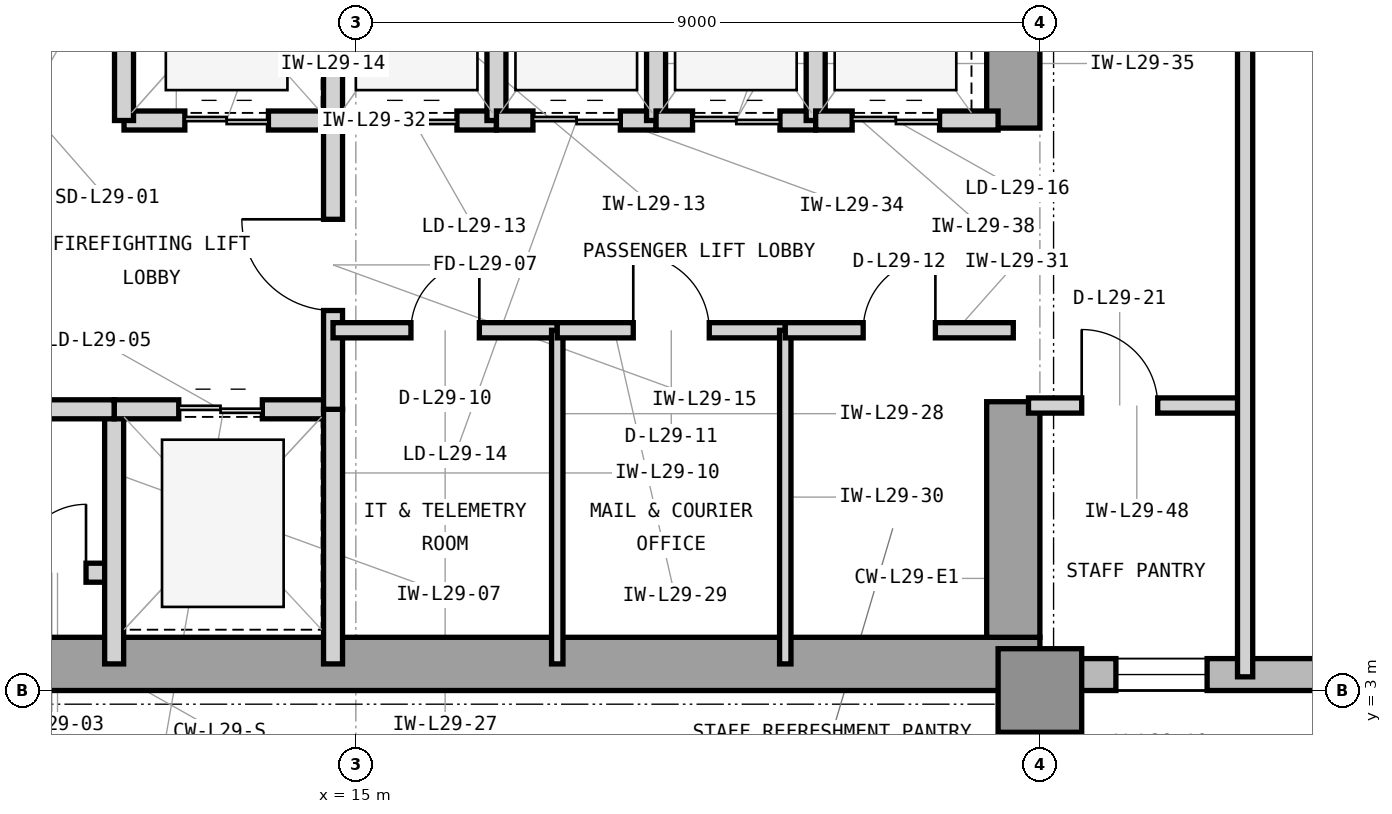
"""IFC4 building model, lengths in metres.
Left out: names, types, materials, properties, quantities, classifications, styles, units other than length and angle.
Written with IfcOpenShell. Run it as: python <this file> out.ifc"""

import sys

from ifc_helpers import new_model, si_unit, direction, frame, frame_2d, origin, origin_2d, place, context, subcontext, project, spatial, rectangle, extrude, element, fill, save


model = new_model("IFC4")
c1 = context("Model", 3, precision=1e-05, world=origin(), true_north=direction((0.0, 1.0)))
c2 = subcontext(c1, "Body", "Model", "MODEL_VIEW")
j1 = project(units=[si_unit("LENGTHUNIT", "METRE"), si_unit("PLANEANGLEUNIT", "RADIAN")], contexts=[c1])
p1 = place(None, origin())
s1 = spatial("IfcSite", under=j1, at=p1, CompositionType="ELEMENT")
p2 = place(p1, origin())
s2 = spatial("IfcBuilding", under=s1, at=p2, CompositionType="ELEMENT")
p3 = place(p2, frame((0.0, 0.0, 124.5)))
s3 = spatial("IfcBuildingStorey", under=s2, at=p3, CompositionType="ELEMENT", Elevation=124.5)
p4 = place(p3, frame((7.475, 3.35, 0.0), z_axis=(0.0, 0.0, 1.0), x_axis=(1.0, 0.0, 0.0)))
e1 = element("IfcWall", 1, at=p4, inside=s3, PredefinedType="SHEAR", context=c2, shape_type="SweptSolid", body=[
    extrude(rectangle(XDim=16.525, YDim=0.7, at=frame_2d((8.262, 0.0))), origin(), (0.0, 0.0, 1.0), 3.9),
])
p5 = place(p3, frame((23.65, 3.7, 0.0), z_axis=(0.0, 0.0, 1.0), x_axis=(0.0, 1.0, 0.0)))
e2 = element("IfcWall", 2, at=p5, inside=s3, PredefinedType="SHEAR", context=c2, shape_type="SweptSolid", body=[
    extrude(rectangle(XDim=3.1, YDim=0.7, at=frame_2d((1.55, 0.0))), origin(), (0.0, 0.0, 1.0), 3.9),
])
p6 = place(p3, frame((23.65, 10.4, 0.0), z_axis=(0.0, 0.0, 1.0), x_axis=(0.0, 1.0, 0.0)))
e3 = element("IfcWall", 3, at=p6, inside=s3, PredefinedType="SHEAR", context=c2, shape_type="SweptSolid", body=[
    extrude(rectangle(XDim=3.2, YDim=0.7, at=frame_2d((1.6, 0.0))), origin(), (0.0, 0.0, 1.0), 3.9),
])
p7 = place(p3, frame((24.0, 3.0, 0.0), z_axis=(0.0, 0.0, 1.0), x_axis=(1.0, 0.0, 0.0)))
e4 = element("IfcColumn", 4, at=p7, inside=s3, PredefinedType="COLUMN", context=c2, shape_type="SweptSolid", body=[
    extrude(rectangle(XDim=1.1, YDim=1.1, at=origin_2d()), origin(), (0.0, 0.0, 1.0), 3.9),
])
p8 = place(p3, frame((23.9, 3.21, 0.0), z_axis=(0.0, 0.0, 1.0), x_axis=(1.0, 0.0, 0.0)))
e5 = element("IfcWall", 5, at=p8, inside=s3, PredefinedType="STANDARD", context=c2, shape_type="SweptSolid", body=[
    extrude(rectangle(XDim=18.1, YDim=0.42, at=frame_2d((9.05, 0.0))), origin(), (0.0, 0.0, 1.0), 3.7),
])
p9 = place(p8, frame((5.538, 0.0, 0.85)))
e6 = element("IfcOpeningElement", 6, at=p9, cuts=e5, PredefinedType="OPENING", context=c2, shape_type="SweptSolid", body=[
    extrude(rectangle(XDim=2.5, YDim=2.25, at=frame_2d((1.25, 1.125))), frame((0.0, 0.22, 0.0), z_axis=(0.0, -1.0, 0.0), x_axis=(1.0, 0.0, 0.0)), (0.0, 0.0, 1.0), 0.44),
])
p10 = place(p8, frame((14.938, 0.0, 0.85)))
e7 = element("IfcOpeningElement", 7, at=p10, cuts=e5, PredefinedType="OPENING", context=c2, shape_type="SweptSolid", body=[
    extrude(rectangle(XDim=1.8, YDim=2.25, at=frame_2d((0.9, 1.125))), frame((0.0, 0.22, 0.0), z_axis=(0.0, -1.0, 0.0), x_axis=(1.0, 0.0, 0.0)), (0.0, 0.0, 1.0), 0.44),
])
p11 = place(p8, frame((1.1, 0.0, 0.85)))
e8 = element("IfcOpeningElement", 8, at=p11, cuts=e5, PredefinedType="OPENING", context=c2, shape_type="SweptSolid", body=[
    extrude(rectangle(XDim=1.2, YDim=2.25, at=frame_2d((0.6, 1.125))), frame((0.0, 0.22, 0.0), z_axis=(0.0, -1.0, 0.0), x_axis=(1.0, 0.0, 0.0)), (0.0, 0.0, 1.0), 0.44),
])
p12 = place(p3, frame((10.33, 4.55, 0.0), z_axis=(0.0, 0.0, 1.0), x_axis=(1.0, 0.0, 0.0)))
e9 = element("IfcWall", 9, at=p12, inside=s3, PredefinedType="PARTITIONING", context=c2, shape_type="SweptSolid", body=[
    extrude(rectangle(XDim=1.49, YDim=0.25, at=frame_2d((0.745, 0.0))), origin(), (0.0, 0.0, 1.0), 3.69),
])
p13 = place(p12, frame((0.22, 0.0, 0.0)))
e10 = element("IfcOpeningElement", 10, at=p13, cuts=e9, PredefinedType="OPENING", context=c2, shape_type="SweptSolid", body=[
    extrude(rectangle(XDim=0.9, YDim=2.1, at=frame_2d((0.45, 1.05))), frame((0.0, 0.135, 0.0), z_axis=(0.0, -1.0, 0.0), x_axis=(1.0, 0.0, 0.0)), (0.0, 0.0, 1.0), 0.27),
])
p14 = place(p3, frame((11.82, 3.35, 0.0), z_axis=(0.0, 0.0, 1.0), x_axis=(0.0, 1.0, 0.0)))
e11 = element("IfcWall", 11, at=p14, inside=s3, PredefinedType="PARTITIONING", context=c2, shape_type="SweptSolid", body=[
    extrude(rectangle(XDim=3.35, YDim=0.25, at=frame_2d((1.675, 0.0))), origin(), (0.0, 0.0, 1.0), 3.69),
])
p15 = place(p3, frame((11.82, 6.7, 0.0), z_axis=(0.0, 0.0, 1.0), x_axis=(1.0, 0.0, 0.0)))
e12 = element("IfcWall", 12, at=p15, inside=s3, PredefinedType="PARTITIONING", context=c2, shape_type="SweptSolid", body=[
    extrude(rectangle(XDim=2.88, YDim=0.25, at=frame_2d((1.44, 0.0))), origin(), (0.0, 0.0, 1.0), 3.233),
])
p16 = place(p15, frame((0.85, 0.0, 0.0)))
e13 = element("IfcOpeningElement", 13, at=p16, cuts=e12, PredefinedType="OPENING", context=c2, shape_type="SweptSolid", body=[
    extrude(rectangle(XDim=1.1, YDim=2.25, at=frame_2d((0.55, 1.125))), frame((0.0, 0.135, 0.0), z_axis=(0.0, -1.0, 0.0), x_axis=(1.0, 0.0, 0.0)), (0.0, 0.0, 1.0), 0.27),
])
p17 = place(p3, frame((14.7, 3.35, 0.0), z_axis=(0.0, 0.0, 1.0), x_axis=(0.0, 1.0, 0.0)))
e14 = element("IfcWall", 14, at=p17, inside=s3, PredefinedType="PARTITIONING", context=c2, shape_type="SweptSolid", body=[
    extrude(rectangle(XDim=3.35, YDim=0.25, at=frame_2d((1.675, 0.0))), origin(), (0.0, 0.0, 1.0), 3.69),
])
p18 = place(p3, frame((11.95, 10.5, 0.0), z_axis=(0.0, 0.0, 1.0), x_axis=(1.0, 0.0, 0.0)))
e15 = element("IfcWall", 15, at=p18, inside=s3, PredefinedType="PARTITIONING", context=c2, shape_type="SweptSolid", body=[
    extrude(rectangle(XDim=2.75, YDim=0.25, at=frame_2d((1.375, 0.0))), origin(), (0.0, 0.0, 1.0), 3.233),
])
p19 = place(p18, frame((0.8, 0.0, 0.0)))
e16 = element("IfcOpeningElement", 16, at=p19, cuts=e15, PredefinedType="OPENING", context=c2, shape_type="SweptSolid", body=[
    extrude(rectangle(XDim=1.1, YDim=2.25, at=frame_2d((0.55, 1.125))), frame((0.0, 0.135, 0.0), z_axis=(0.0, -1.0, 0.0), x_axis=(1.0, 0.0, 0.0)), (0.0, 0.0, 1.0), 0.27),
])
for number, where, z_axis, x_axis in (
    (17, (11.95, 10.5, 0.0), (0.0, 0.0, 1.0), (0.0, 1.0, 0.0)),
    (18, (14.7, 10.5, 0.0), (0.0, 0.0, 1.0), (0.0, 1.0, 0.0)),
):
    element("IfcWall", number, at=place(p3, frame(where, z_axis=z_axis, x_axis=x_axis)), inside=s3, PredefinedType="PARTITIONING", context=c2, shape_type="SweptSolid", body=[
        extrude(rectangle(XDim=3.0, YDim=0.25, at=frame_2d((1.5, 0.0))), origin(), (0.0, 0.0, 1.0), 3.69),
    ])
p20 = place(p3, frame((14.7, 6.7, 0.0), z_axis=(0.0, 0.0, 1.0), x_axis=(0.0, 1.0, 0.0)))
e19 = element("IfcWall", 19, at=p20, inside=s3, PredefinedType="PARTITIONING", context=c2, shape_type="SweptSolid", body=[
    extrude(rectangle(XDim=3.8, YDim=0.25, at=frame_2d((1.9, 0.0))), origin(), (0.0, 0.0, 1.0), 3.69),
])
p21 = place(p20, frame((1.3, 0.0, 0.0)))
e20 = element("IfcOpeningElement", 20, at=p21, cuts=e19, PredefinedType="OPENING", context=c2, shape_type="SweptSolid", body=[
    extrude(rectangle(XDim=1.2, YDim=2.2, at=frame_2d((0.6, 1.1))), frame((0.0, 0.135, 0.0), z_axis=(0.0, -1.0, 0.0), x_axis=(1.0, 0.0, 0.0)), (0.0, 0.0, 1.0), 0.27),
])
p22 = place(p3, frame((10.33, 6.7, 0.0), z_axis=(0.0, 0.0, 1.0), x_axis=(1.0, 0.0, 0.0)))
e21 = element("IfcWall", 21, at=p22, inside=s3, PredefinedType="PARTITIONING", context=c2, shape_type="SweptSolid", body=[
    extrude(rectangle(XDim=1.49, YDim=0.25, at=frame_2d((0.745, 0.0))), origin(), (0.0, 0.0, 1.0), 3.233),
])
p23 = place(p3, frame((14.7, 7.74, 0.0), z_axis=(0.0, 0.0, 1.0), x_axis=(1.0, 0.0, 0.0)))
e22 = element("IfcWall", 22, at=p23, inside=s3, PredefinedType="PARTITIONING", context=c2, shape_type="SweptSolid", body=[
    extrude(rectangle(XDim=2.95, YDim=0.2, at=frame_2d((1.475, 0.0))), origin(), (0.0, 0.0, 1.0), 3.69),
])
p24 = place(p23, frame((1.025, 0.0, 0.0)))
e23 = element("IfcOpeningElement", 23, at=p24, cuts=e22, PredefinedType="OPENING", context=c2, shape_type="SweptSolid", body=[
    extrude(rectangle(XDim=0.9, YDim=2.1, at=frame_2d((0.45, 1.05))), frame((0.0, 0.11, 0.0), z_axis=(0.0, -1.0, 0.0), x_axis=(1.0, 0.0, 0.0)), (0.0, 0.0, 1.0), 0.22),
])
p25 = place(p3, frame((17.65, 3.35, 0.0), z_axis=(0.0, 0.0, 1.0), x_axis=(0.0, 1.0, 0.0)))
e24 = element("IfcWall", 24, at=p25, inside=s3, PredefinedType="PARTITIONING", context=c2, shape_type="SweptSolid", body=[
    extrude(rectangle(XDim=4.39, YDim=0.15, at=frame_2d((2.195, 0.0))), origin(), (0.0, 0.0, 1.0), 3.69),
])
p26 = place(p3, frame((17.65, 7.74, 0.0), z_axis=(0.0, 0.0, 1.0), x_axis=(1.0, 0.0, 0.0)))
e25 = element("IfcWall", 25, at=p26, inside=s3, PredefinedType="PARTITIONING", context=c2, shape_type="SweptSolid", body=[
    extrude(rectangle(XDim=3.0, YDim=0.2, at=frame_2d((1.5, 0.0))), origin(), (0.0, 0.0, 1.0), 3.69),
])
p27 = place(p26, frame((1.0, 0.0, 0.0)))
e26 = element("IfcOpeningElement", 26, at=p27, cuts=e25, PredefinedType="OPENING", context=c2, shape_type="SweptSolid", body=[
    extrude(rectangle(XDim=1.0, YDim=2.15, at=frame_2d((0.5, 1.075))), frame((0.0, 0.11, 0.0), z_axis=(0.0, -1.0, 0.0), x_axis=(1.0, 0.0, 0.0)), (0.0, 0.0, 1.0), 0.22),
])
p28 = place(p3, frame((20.65, 3.35, 0.0), z_axis=(0.0, 0.0, 1.0), x_axis=(0.0, 1.0, 0.0)))
e27 = element("IfcWall", 27, at=p28, inside=s3, PredefinedType="PARTITIONING", context=c2, shape_type="SweptSolid", body=[
    extrude(rectangle(XDim=4.39, YDim=0.15, at=frame_2d((2.195, 0.0))), origin(), (0.0, 0.0, 1.0), 3.69),
])
p29 = place(p3, frame((20.65, 7.74, 0.0), z_axis=(0.0, 0.0, 1.0), x_axis=(1.0, 0.0, 0.0)))
e28 = element("IfcWall", 28, at=p29, inside=s3, PredefinedType="PARTITIONING", context=c2, shape_type="SweptSolid", body=[
    extrude(rectangle(XDim=3.0, YDim=0.2, at=frame_2d((1.5, 0.0))), origin(), (0.0, 0.0, 1.0), 3.69),
])
p30 = place(p29, frame((1.025, 0.0, 0.0)))
e29 = element("IfcOpeningElement", 29, at=p30, cuts=e28, PredefinedType="OPENING", context=c2, shape_type="SweptSolid", body=[
    extrude(rectangle(XDim=0.95, YDim=2.1, at=frame_2d((0.475, 1.05))), frame((0.0, 0.11, 0.0), z_axis=(0.0, -1.0, 0.0), x_axis=(1.0, 0.0, 0.0)), (0.0, 0.0, 1.0), 0.22),
])
p31 = place(p3, frame((14.7, 10.5, 0.0), z_axis=(0.0, 0.0, 1.0), x_axis=(1.0, 0.0, 0.0)))
e30 = element("IfcWall", 30, at=p31, inside=s3, PredefinedType="PARTITIONING", context=c2, shape_type="SweptSolid", body=[
    extrude(rectangle(XDim=2.15, YDim=0.25, at=frame_2d((1.075, 0.0))), origin(), (0.0, 0.0, 1.0), 3.233),
])
p32 = place(p31, frame((0.48, 0.0, 0.0)))
e31 = element("IfcOpeningElement", 31, at=p32, cuts=e30, PredefinedType="OPENING", context=c2, shape_type="SweptSolid", body=[
    extrude(rectangle(XDim=1.15, YDim=2.25, at=frame_2d((0.575, 1.125))), frame((0.0, 0.135, 0.0), z_axis=(0.0, -1.0, 0.0), x_axis=(1.0, 0.0, 0.0)), (0.0, 0.0, 1.0), 0.27),
])
p33 = place(p3, frame((16.85, 10.5, 0.0), z_axis=(0.0, 0.0, 1.0), x_axis=(0.0, 1.0, 0.0)))
e32 = element("IfcWall", 32, at=p33, inside=s3, PredefinedType="PARTITIONING", context=c2, shape_type="SweptSolid", body=[
    extrude(rectangle(XDim=3.0, YDim=0.25, at=frame_2d((1.5, 0.0))), origin(), (0.0, 0.0, 1.0), 3.69),
])
p34 = place(p3, frame((16.85, 10.5, 0.0), z_axis=(0.0, 0.0, 1.0), x_axis=(1.0, 0.0, 0.0)))
e33 = element("IfcWall", 33, at=p34, inside=s3, PredefinedType="PARTITIONING", context=c2, shape_type="SweptSolid", body=[
    extrude(rectangle(XDim=2.1, YDim=0.25, at=frame_2d((1.05, 0.0))), origin(), (0.0, 0.0, 1.0), 3.233),
])
p35 = place(p34, frame((0.48, 0.0, 0.0)))
e34 = element("IfcOpeningElement", 34, at=p35, cuts=e33, PredefinedType="OPENING", context=c2, shape_type="SweptSolid", body=[
    extrude(rectangle(XDim=1.15, YDim=2.25, at=frame_2d((0.575, 1.125))), frame((0.0, 0.135, 0.0), z_axis=(0.0, -1.0, 0.0), x_axis=(1.0, 0.0, 0.0)), (0.0, 0.0, 1.0), 0.27),
])
p36 = place(p3, frame((18.95, 10.5, 0.0), z_axis=(0.0, 0.0, 1.0), x_axis=(0.0, 1.0, 0.0)))
e35 = element("IfcWall", 35, at=p36, inside=s3, PredefinedType="PARTITIONING", context=c2, shape_type="SweptSolid", body=[
    extrude(rectangle(XDim=3.0, YDim=0.25, at=frame_2d((1.5, 0.0))), origin(), (0.0, 0.0, 1.0), 3.69),
])
p37 = place(p3, frame((18.95, 10.5, 0.0), z_axis=(0.0, 0.0, 1.0), x_axis=(1.0, 0.0, 0.0)))
e36 = element("IfcWall", 36, at=p37, inside=s3, PredefinedType="PARTITIONING", context=c2, shape_type="SweptSolid", body=[
    extrude(rectangle(XDim=2.1, YDim=0.25, at=frame_2d((1.05, 0.0))), origin(), (0.0, 0.0, 1.0), 3.233),
])
p38 = place(p37, frame((0.48, 0.0, 0.0)))
e37 = element("IfcOpeningElement", 37, at=p38, cuts=e36, PredefinedType="OPENING", context=c2, shape_type="SweptSolid", body=[
    extrude(rectangle(XDim=1.15, YDim=2.25, at=frame_2d((0.575, 1.125))), frame((0.0, 0.135, 0.0), z_axis=(0.0, -1.0, 0.0), x_axis=(1.0, 0.0, 0.0)), (0.0, 0.0, 1.0), 0.27),
])
p39 = place(p3, frame((21.05, 10.5, 0.0), z_axis=(0.0, 0.0, 1.0), x_axis=(0.0, 1.0, 0.0)))
e38 = element("IfcWall", 38, at=p39, inside=s3, PredefinedType="PARTITIONING", context=c2, shape_type="SweptSolid", body=[
    extrude(rectangle(XDim=3.0, YDim=0.25, at=frame_2d((1.5, 0.0))), origin(), (0.0, 0.0, 1.0), 3.69),
])
p40 = place(p3, frame((21.05, 10.5, 0.0), z_axis=(0.0, 0.0, 1.0), x_axis=(1.0, 0.0, 0.0)))
e39 = element("IfcWall", 39, at=p40, inside=s3, PredefinedType="PARTITIONING", context=c2, shape_type="SweptSolid", body=[
    extrude(rectangle(XDim=2.4, YDim=0.25, at=frame_2d((1.2, 0.0))), origin(), (0.0, 0.0, 1.0), 3.233),
])
p41 = place(p40, frame((0.48, 0.0, 0.0)))
e40 = element("IfcOpeningElement", 40, at=p41, cuts=e39, PredefinedType="OPENING", context=c2, shape_type="SweptSolid", body=[
    extrude(rectangle(XDim=1.15, YDim=2.25, at=frame_2d((0.575, 1.125))), frame((0.0, 0.135, 0.0), z_axis=(0.0, -1.0, 0.0), x_axis=(1.0, 0.0, 0.0)), (0.0, 0.0, 1.0), 0.27),
])
p42 = place(p3, frame((23.85, 6.75, 0.0), z_axis=(0.0, 0.0, 1.0), x_axis=(1.0, 0.0, 0.0)))
e41 = element("IfcWall", 41, at=p42, inside=s3, PredefinedType="PARTITIONING", context=c2, shape_type="SweptSolid", body=[
    extrude(rectangle(XDim=2.85, YDim=0.2, at=frame_2d((1.425, 0.0))), origin(), (0.0, 0.0, 1.0), 3.69),
])
p43 = place(p42, frame((0.7, 0.0, 0.0)))
e42 = element("IfcOpeningElement", 42, at=p43, cuts=e41, PredefinedType="OPENING", context=c2, shape_type="SweptSolid", body=[
    extrude(rectangle(XDim=1.0, YDim=2.15, at=frame_2d((0.5, 1.075))), frame((0.0, 0.11, 0.0), z_axis=(0.0, -1.0, 0.0), x_axis=(1.0, 0.0, 0.0)), (0.0, 0.0, 1.0), 0.22),
])
p44 = place(p3, frame((26.7, 3.18, 0.0), z_axis=(0.0, 0.0, 1.0), x_axis=(0.0, 1.0, 0.0)))
e43 = element("IfcWall", 43, at=p44, inside=s3, PredefinedType="PARTITIONING", context=c2, shape_type="SweptSolid", body=[
    extrude(rectangle(XDim=14.82, YDim=0.2, at=frame_2d((7.41, 0.0))), origin(), (0.0, 0.0, 1.0), 3.69),
])
p45 = place(p13, origin())
e44 = element("IfcDoor", 44, at=p45, inside=s3, OperationType="SINGLE_SWING_RIGHT", PredefinedType="TRAPDOOR", context=c2, shape_type="SweptSolid", body=[
    extrude(rectangle(XDim=0.9, YDim=2.1, at=frame_2d((0.45, 1.05))), frame((0.0, 0.025, 0.0), z_axis=(0.0, -1.0, 0.0), x_axis=(1.0, 0.0, 0.0)), (0.0, 0.0, 1.0), 0.05),
])
fill(e10, e44)
p46 = place(p16, origin())
e45 = element("IfcDoor", 45, at=p46, inside=s3, OperationType="DOUBLE_DOOR_SLIDING", PredefinedType="DOOR", context=c2, shape_type="SweptSolid", body=[
    extrude(rectangle(XDim=1.1, YDim=2.25, at=frame_2d((0.55, 1.125))), frame((0.0, 0.025, 0.0), z_axis=(0.0, -1.0, 0.0), x_axis=(1.0, 0.0, 0.0)), (0.0, 0.0, 1.0), 0.05),
])
fill(e13, e45)
p47 = place(p19, origin())
e46 = element("IfcDoor", 46, at=p47, inside=s3, OperationType="DOUBLE_DOOR_SLIDING", PredefinedType="DOOR", context=c2, shape_type="SweptSolid", body=[
    extrude(rectangle(XDim=1.1, YDim=2.25, at=frame_2d((0.55, 1.125))), frame((0.0, 0.025, 0.0), z_axis=(0.0, -1.0, 0.0), x_axis=(1.0, 0.0, 0.0)), (0.0, 0.0, 1.0), 0.05),
])
fill(e16, e46)
p48 = place(p21, origin())
e47 = element("IfcDoor", 47, at=p48, inside=s3, OperationType="SINGLE_SWING_RIGHT", PredefinedType="DOOR", context=c2, shape_type="SweptSolid", body=[
    extrude(rectangle(XDim=1.2, YDim=2.2, at=frame_2d((0.6, 1.1))), frame((0.0, 0.025, 0.0), z_axis=(0.0, -1.0, 0.0), x_axis=(1.0, 0.0, 0.0)), (0.0, 0.0, 1.0), 0.05),
])
fill(e20, e47)
p49 = place(p24, origin())
e48 = element("IfcDoor", 48, at=p49, inside=s3, OperationType="SINGLE_SWING_RIGHT", PredefinedType="TRAPDOOR", context=c2, shape_type="SweptSolid", body=[
    extrude(rectangle(XDim=0.9, YDim=2.1, at=frame_2d((0.45, 1.05))), frame((0.0, 0.025, 0.0), z_axis=(0.0, -1.0, 0.0), x_axis=(1.0, 0.0, 0.0)), (0.0, 0.0, 1.0), 0.05),
])
fill(e23, e48)
p50 = place(p27, origin())
e49 = element("IfcDoor", 49, at=p50, inside=s3, OperationType="SINGLE_SWING_LEFT", PredefinedType="DOOR", context=c2, shape_type="SweptSolid", body=[
    extrude(rectangle(XDim=1.0, YDim=2.15, at=frame_2d((0.5, 1.075))), frame((0.0, 0.025, 0.0), z_axis=(0.0, -1.0, 0.0), x_axis=(1.0, 0.0, 0.0)), (0.0, 0.0, 1.0), 0.05),
])
fill(e26, e49)
p51 = place(p30, origin())
e50 = element("IfcDoor", 50, at=p51, inside=s3, OperationType="SINGLE_SWING_RIGHT", PredefinedType="DOOR", context=c2, shape_type="SweptSolid", body=[
    extrude(rectangle(XDim=0.95, YDim=2.1, at=frame_2d((0.475, 1.05))), frame((0.0, 0.025, 0.0), z_axis=(0.0, -1.0, 0.0), x_axis=(1.0, 0.0, 0.0)), (0.0, 0.0, 1.0), 0.05),
])
fill(e29, e50)
p52 = place(p32, origin())
e51 = element("IfcDoor", 51, at=p52, inside=s3, OperationType="DOUBLE_DOOR_SLIDING", PredefinedType="DOOR", context=c2, shape_type="SweptSolid", body=[
    extrude(rectangle(XDim=1.15, YDim=2.25, at=frame_2d((0.575, 1.125))), frame((0.0, 0.025, 0.0), z_axis=(0.0, -1.0, 0.0), x_axis=(1.0, 0.0, 0.0)), (0.0, 0.0, 1.0), 0.05),
])
fill(e31, e51)
p53 = place(p35, origin())
e52 = element("IfcDoor", 52, at=p53, inside=s3, OperationType="DOUBLE_DOOR_SLIDING", PredefinedType="DOOR", context=c2, shape_type="SweptSolid", body=[
    extrude(rectangle(XDim=1.15, YDim=2.25, at=frame_2d((0.575, 1.125))), frame((0.0, 0.025, 0.0), z_axis=(0.0, -1.0, 0.0), x_axis=(1.0, 0.0, 0.0)), (0.0, 0.0, 1.0), 0.05),
])
fill(e34, e52)
p54 = place(p38, origin())
e53 = element("IfcDoor", 53, at=p54, inside=s3, OperationType="DOUBLE_DOOR_SLIDING", PredefinedType="DOOR", context=c2, shape_type="SweptSolid", body=[
    extrude(rectangle(XDim=1.15, YDim=2.25, at=frame_2d((0.575, 1.125))), frame((0.0, 0.025, 0.0), z_axis=(0.0, -1.0, 0.0), x_axis=(1.0, 0.0, 0.0)), (0.0, 0.0, 1.0), 0.05),
])
fill(e37, e53)
p55 = place(p41, origin())
e54 = element("IfcDoor", 54, at=p55, inside=s3, OperationType="DOUBLE_DOOR_SLIDING", PredefinedType="DOOR", context=c2, shape_type="SweptSolid", body=[
    extrude(rectangle(XDim=1.15, YDim=2.25, at=frame_2d((0.575, 1.125))), frame((0.0, 0.025, 0.0), z_axis=(0.0, -1.0, 0.0), x_axis=(1.0, 0.0, 0.0)), (0.0, 0.0, 1.0), 0.05),
])
fill(e40, e54)
p56 = place(p43, origin())
e55 = element("IfcDoor", 55, at=p56, inside=s3, OperationType="SINGLE_SWING_LEFT", PredefinedType="DOOR", context=c2, shape_type="SweptSolid", body=[
    extrude(rectangle(XDim=1.0, YDim=2.15, at=frame_2d((0.5, 1.075))), frame((0.0, 0.025, 0.0), z_axis=(0.0, -1.0, 0.0), x_axis=(1.0, 0.0, 0.0)), (0.0, 0.0, 1.0), 0.05),
])
fill(e42, e55)
p57 = place(p11, origin())
e56 = element("IfcWindow", 56, at=p57, inside=s3, PartitioningType="SINGLE_PANEL", PredefinedType="WINDOW", context=c2, shape_type="SweptSolid", body=[
    extrude(rectangle(XDim=1.2, YDim=2.25, at=frame_2d((0.6, 1.125))), frame((0.0, 0.11, 0.0), z_axis=(0.0, -1.0, 0.0), x_axis=(1.0, 0.0, 0.0)), (0.0, 0.0, 1.0), 0.06),
])
fill(e8, e56)
save(model, sys.argv[1])
